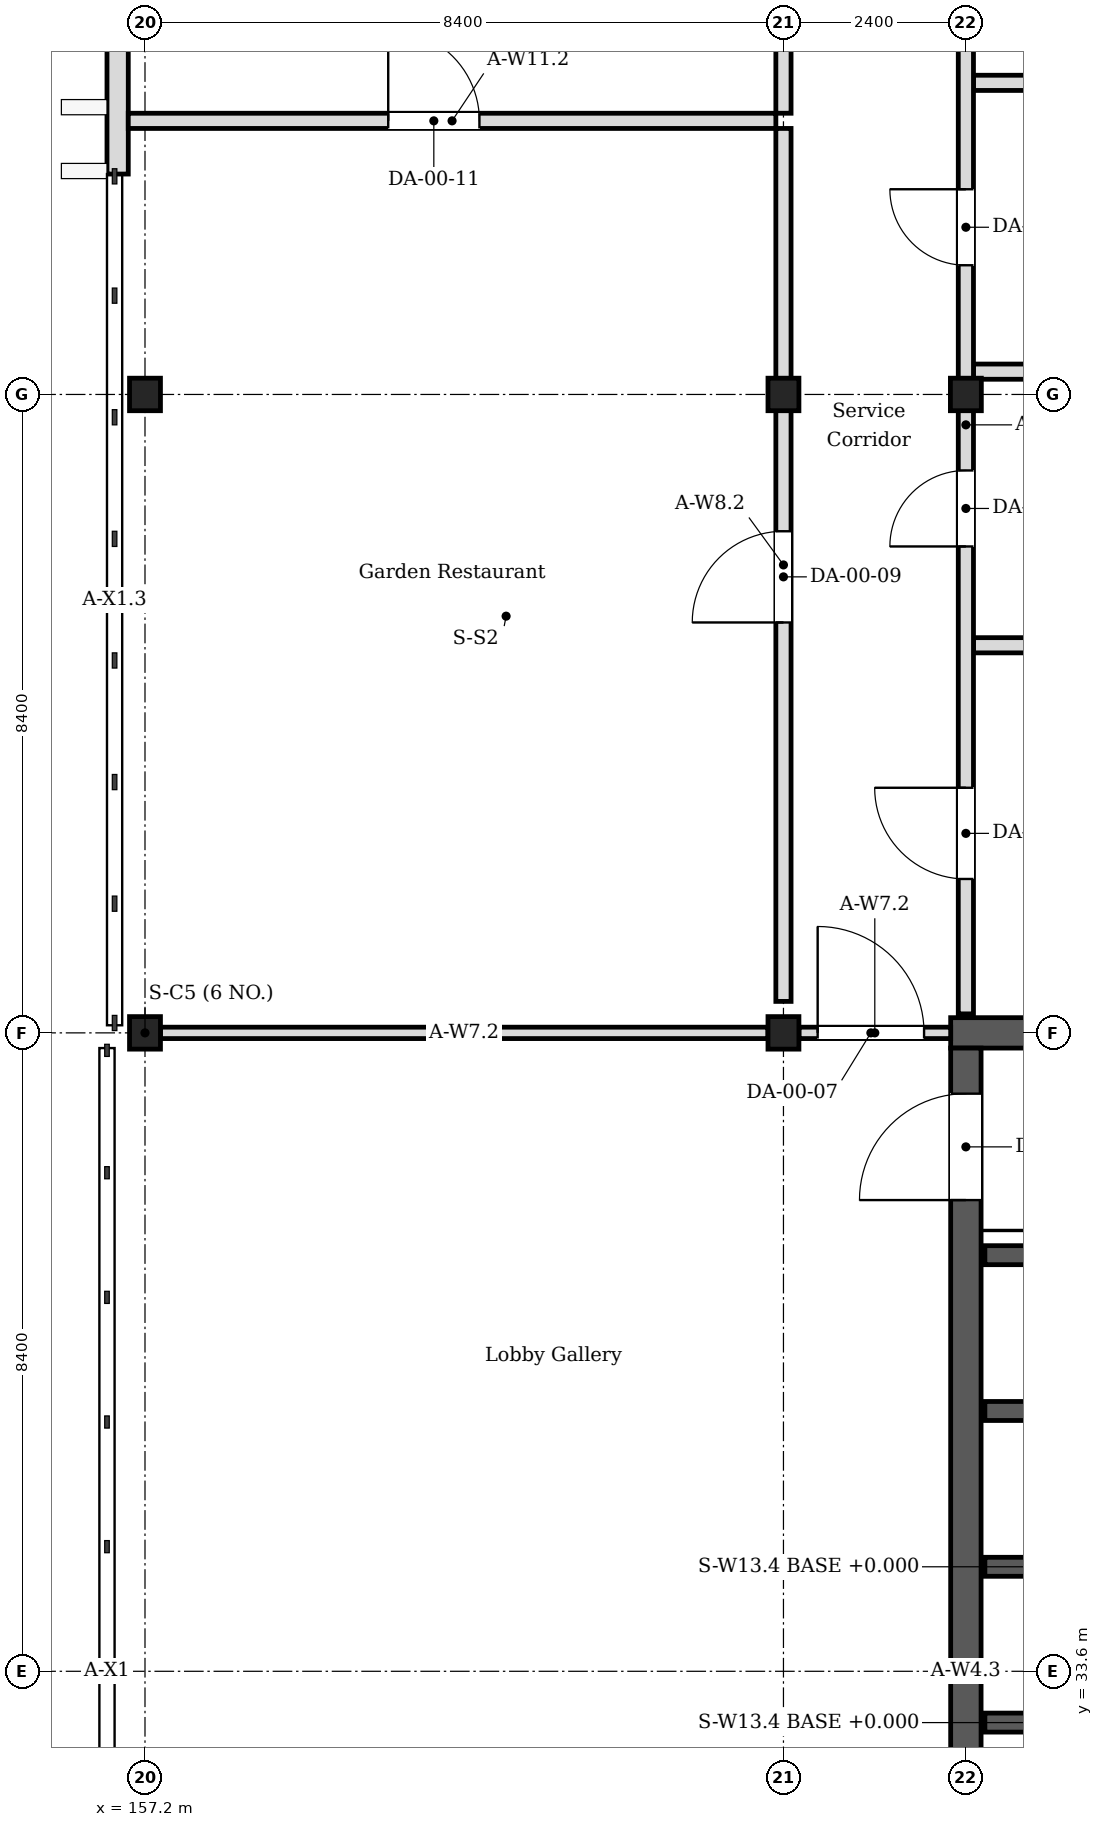
"""IFC4 building model, lengths in metres.
Left out: names, types, materials, properties, quantities, classifications, styles, units other than length and angle.
Written with IfcOpenShell. Run it as: python <this file> out.ifc"""

import sys

from ifc_helpers import new_model, si_unit, direction, frame, frame_2d, origin, origin_2d, place, context, subcontext, project, spatial, rectangle, i_section, extrude, element, fill, save


model = new_model("IFC4")
c1 = context("Model", 3, precision=1e-05, world=origin(), true_north=direction((0.0, 1.0)))
c2 = subcontext(c1, "Body", "Model", "MODEL_VIEW")
j1 = project(units=[si_unit("LENGTHUNIT", "METRE"), si_unit("PLANEANGLEUNIT", "RADIAN")], contexts=[c1])
p1 = place(None, origin())
s1 = spatial("IfcSite", under=j1, at=p1, CompositionType="ELEMENT")
p2 = place(p1, origin())
s2 = spatial("IfcBuilding", under=s1, at=p2, CompositionType="ELEMENT")
p3 = place(p2, origin())
s3 = spatial("IfcBuildingStorey", under=s2, at=p3, CompositionType="ELEMENT", Elevation=0.0)
for number, where, z_axis, x_axis in (
    (1, (157.2, 42.0, 0.0), (0.0, 0.0, 1.0), (1.0, 0.0, 0.0)),
    (2, (157.2, 50.4, 0.0), (0.0, 0.0, 1.0), (1.0, 0.0, 0.0)),
    (3, (165.6, 42.0, 0.0), (0.0, 0.0, 1.0), (1.0, 0.0, 0.0)),
    (4, (165.6, 50.4, 0.0), (0.0, 0.0, 1.0), (1.0, 0.0, 0.0)),
    (5, (168.0, 50.4, 0.0), (0.0, 0.0, 1.0), (1.0, 0.0, 0.0)),
):
    element("IfcColumn", number, at=place(p3, frame(where, z_axis=z_axis, x_axis=x_axis)), inside=s3, PredefinedType="COLUMN", context=c2, shape_type="SweptSolid", body=[
        extrude(i_section(OverallWidth=0.407, OverallDepth=0.428, WebThickness=0.02, FlangeThickness=0.035, FilletRadius=0.022, at=origin_2d()), origin(), (0.0, 0.0, 1.0), 6.0),
    ])
p4 = place(p3, frame((167.8, 42.0, 0.0), z_axis=(0.0, 0.0, 1.0), x_axis=(1.0, 0.0, 0.0)))
e6 = element("IfcWall", 6, at=p4, inside=s3, PredefinedType="SOLIDWALL", context=c2, shape_type="SweptSolid", body=[
    extrude(rectangle(XDim=8.8, YDim=0.4, at=frame_2d((4.4, 0.0))), origin(), (0.0, 0.0, 1.0), 5.85),
])
p5 = place(p3, frame((168.0, 25.4, 0.0), z_axis=(0.0, 0.0, 1.0), x_axis=(0.0, 1.0, 0.0)))
e7 = element("IfcWall", 7, at=p5, inside=s3, PredefinedType="SOLIDWALL", context=c2, shape_type="SweptSolid", body=[
    extrude(rectangle(XDim=16.4, YDim=0.4, at=frame_2d((8.2, 0.0))), origin(), (0.0, 0.0, 1.0), 5.85),
])
p6 = place(p5, frame((1.0, 0.0, 0.0)))
e8 = element("IfcOpeningElement", 8, at=p6, cuts=e7, PredefinedType="OPENING", context=c2, shape_type="SweptSolid", body=[
    extrude(rectangle(XDim=1.0, YDim=2.1, at=frame_2d((0.5, 1.05))), frame((0.0, 0.21, 0.0), z_axis=(0.0, -1.0, 0.0), x_axis=(1.0, 0.0, 0.0)), (0.0, 0.0, 1.0), 0.42),
])
p7 = place(p5, frame((14.4, 0.0, 0.0)))
e9 = element("IfcOpeningElement", 9, at=p7, cuts=e7, PredefinedType="OPENING", context=c2, shape_type="SweptSolid", body=[
    extrude(rectangle(XDim=1.4, YDim=2.1, at=frame_2d((0.7, 1.05))), frame((0.0, 0.21, 0.0), z_axis=(0.0, -1.0, 0.0), x_axis=(1.0, 0.0, 0.0)), (0.0, 0.0, 1.0), 0.42),
])
p8 = place(p3, frame((156.84, 53.3, 0.0), z_axis=(0.0, 0.0, 1.0), x_axis=(0.0, 1.0, 0.0)))
e10 = element("IfcWall", 10, at=p8, inside=s3, PredefinedType="SOLIDWALL", context=c2, shape_type="SweptSolid", body=[
    extrude(rectangle(XDim=14.12, YDim=0.28, at=frame_2d((7.06, 0.0))), origin(), (0.0, 0.0, 1.0), 5.85),
])
p9 = place(p8, frame((5.44, 0.0, 0.6)))
e11 = element("IfcOpeningElement", 11, at=p9, cuts=e10, PredefinedType="OPENING", context=c2, shape_type="SweptSolid", body=[
    extrude(rectangle(XDim=2.52, YDim=2.4, at=frame_2d((1.26, 1.2))), frame((0.0, 0.15, 0.0), z_axis=(0.0, -1.0, 0.0), x_axis=(1.0, 0.0, 0.0)), (0.0, 0.0, 1.0), 0.3),
])
for number, where, z_axis, x_axis in (
    (12, (168.1, 47.1, 0.0), (0.0, 0.0, 1.0), (1.0, 0.0, 0.0)),
    (13, (168.1, 50.7, 0.0), (0.0, 0.0, 1.0), (1.0, 0.0, 0.0)),
    (14, (168.1, 54.5, 0.0), (0.0, 0.0, 1.0), (1.0, 0.0, 0.0)),
):
    element("IfcWall", number, at=place(p3, frame(where, z_axis=z_axis, x_axis=x_axis)), inside=s3, PredefinedType="PARTITIONING", context=c2, shape_type="SweptSolid", body=[
        extrude(rectangle(XDim=8.52, YDim=0.2, at=frame_2d((4.26, 0.0))), origin(), (0.0, 0.0, 1.0), 5.25),
    ])
p10 = place(p3, frame((157.404, 42.0, 0.0), z_axis=(0.0, 0.0, 1.0), x_axis=(1.0, 0.0, 0.0)))
e15 = element("IfcWall", 15, at=p10, inside=s3, PredefinedType="PARTITIONING", context=c2, shape_type="SweptSolid", body=[
    extrude(rectangle(XDim=7.993, YDim=0.15, at=frame_2d((3.997, 0.0))), origin(), (0.0, 0.0, 1.0), 5.404),
])
p11 = place(p3, frame((165.803, 42.0, 0.0), z_axis=(0.0, 0.0, 1.0), x_axis=(1.0, 0.0, 0.0)))
e16 = element("IfcWall", 16, at=p11, inside=s3, PredefinedType="PARTITIONING", context=c2, shape_type="SweptSolid", body=[
    extrude(rectangle(XDim=1.997, YDim=0.15, at=frame_2d((0.998, 0.0))), origin(), (0.0, 0.0, 1.0), 5.404),
])
p12 = place(p11, frame((0.247, 0.0, 0.0)))
e17 = element("IfcOpeningElement", 17, at=p12, cuts=e16, PredefinedType="OPENING", context=c2, shape_type="SweptSolid", body=[
    extrude(rectangle(XDim=1.4, YDim=2.1, at=frame_2d((0.7, 1.05))), frame((0.0, 0.085, 0.0), z_axis=(0.0, -1.0, 0.0), x_axis=(1.0, 0.0, 0.0)), (0.0, 0.0, 1.0), 0.17),
])
p13 = place(p3, frame((156.98, 54.0, 0.0), z_axis=(0.0, 0.0, 1.0), x_axis=(1.0, 0.0, 0.0)))
e18 = element("IfcWall", 18, at=p13, inside=s3, PredefinedType="PARTITIONING", context=c2, shape_type="SweptSolid", body=[
    extrude(rectangle(XDim=8.52, YDim=0.2, at=frame_2d((4.26, 0.0))), origin(), (0.0, 0.0, 1.0), 5.25),
])
p14 = place(p13, frame((3.42, 0.0, 0.0)))
e19 = element("IfcOpeningElement", 19, at=p14, cuts=e18, PredefinedType="OPENING", context=c2, shape_type="SweptSolid", body=[
    extrude(rectangle(XDim=1.2, YDim=2.1, at=frame_2d((0.6, 1.05))), frame((0.0, 0.11, 0.0), z_axis=(0.0, -1.0, 0.0), x_axis=(1.0, 0.0, 0.0)), (0.0, 0.0, 1.0), 0.22),
])
p15 = place(p3, frame((165.6, 42.414, 0.0), z_axis=(0.0, 0.0, 1.0), x_axis=(0.0, 1.0, 0.0)))
e20 = element("IfcWall", 20, at=p15, inside=s3, PredefinedType="PARTITIONING", context=c2, shape_type="SweptSolid", body=[
    extrude(rectangle(XDim=11.486, YDim=0.2, at=frame_2d((5.743, 0.0))), origin(), (0.0, 0.0, 1.0), 5.25),
])
p16 = place(p15, frame((4.986, 0.0, 0.0)))
e21 = element("IfcOpeningElement", 21, at=p16, cuts=e20, PredefinedType="OPENING", context=c2, shape_type="SweptSolid", body=[
    extrude(rectangle(XDim=1.2, YDim=2.1, at=frame_2d((0.6, 1.05))), frame((0.0, 0.11, 0.0), z_axis=(0.0, -1.0, 0.0), x_axis=(1.0, 0.0, 0.0)), (0.0, 0.0, 1.0), 0.22),
])
p17 = place(p3, frame((165.6, 54.1, 0.0), z_axis=(0.0, 0.0, 1.0), x_axis=(0.0, 1.0, 0.0)))
e22 = element("IfcWall", 22, at=p17, inside=s3, PredefinedType="PARTITIONING", context=c2, shape_type="SweptSolid", body=[
    extrude(rectangle(XDim=12.886, YDim=0.2, at=frame_2d((6.443, 0.0))), origin(), (0.0, 0.0, 1.0), 5.25),
])
p18 = place(p17, frame((5.3, 0.0, 0.0)))
e23 = element("IfcOpeningElement", 23, at=p18, cuts=e22, PredefinedType="OPENING", context=c2, shape_type="SweptSolid", body=[
    extrude(rectangle(XDim=1.2, YDim=2.1, at=frame_2d((0.6, 1.05))), frame((0.0, 0.11, 0.0), z_axis=(0.0, -1.0, 0.0), x_axis=(1.0, 0.0, 0.0)), (0.0, 0.0, 1.0), 0.22),
])
p19 = place(p3, frame((168.0, 42.25, 0.0), z_axis=(0.0, 0.0, 1.0), x_axis=(0.0, 1.0, 0.0)))
e24 = element("IfcWall", 24, at=p19, inside=s3, PredefinedType="PARTITIONING", context=c2, shape_type="SweptSolid", body=[
    extrude(rectangle(XDim=16.35, YDim=0.2, at=frame_2d((8.175, 0.0))), origin(), (0.0, 0.0, 1.0), 5.25),
])
p20 = place(p19, frame((1.775, 0.0, 0.0)))
e25 = element("IfcOpeningElement", 25, at=p20, cuts=e24, PredefinedType="OPENING", context=c2, shape_type="SweptSolid", body=[
    extrude(rectangle(XDim=1.2, YDim=2.1, at=frame_2d((0.6, 1.05))), frame((0.0, 0.11, 0.0), z_axis=(0.0, -1.0, 0.0), x_axis=(1.0, 0.0, 0.0)), (0.0, 0.0, 1.0), 0.22),
])
p21 = place(p19, frame((6.15, 0.0, 0.0)))
e26 = element("IfcOpeningElement", 26, at=p21, cuts=e24, PredefinedType="OPENING", context=c2, shape_type="SweptSolid", body=[
    extrude(rectangle(XDim=1.0, YDim=2.1, at=frame_2d((0.5, 1.05))), frame((0.0, 0.11, 0.0), z_axis=(0.0, -1.0, 0.0), x_axis=(1.0, 0.0, 0.0)), (0.0, 0.0, 1.0), 0.22),
])
p22 = place(p19, frame((9.85, 0.0, 0.0)))
e27 = element("IfcOpeningElement", 27, at=p22, cuts=e24, PredefinedType="OPENING", context=c2, shape_type="SweptSolid", body=[
    extrude(rectangle(XDim=1.0, YDim=2.1, at=frame_2d((0.5, 1.05))), frame((0.0, 0.11, 0.0), z_axis=(0.0, -1.0, 0.0), x_axis=(1.0, 0.0, 0.0)), (0.0, 0.0, 1.0), 0.22),
])
p23 = place(p19, frame((12.8, 0.0, 0.0)))
e28 = element("IfcOpeningElement", 28, at=p23, cuts=e24, PredefinedType="OPENING", context=c2, shape_type="SweptSolid", body=[
    extrude(rectangle(XDim=1.0, YDim=2.1, at=frame_2d((0.5, 1.05))), frame((0.0, 0.11, 0.0), z_axis=(0.0, -1.0, 0.0), x_axis=(1.0, 0.0, 0.0)), (0.0, 0.0, 1.0), 0.22),
])
p24 = place(p19, frame((14.9, 0.0, 0.0)))
e29 = element("IfcOpeningElement", 29, at=p24, cuts=e24, PredefinedType="OPENING", context=c2, shape_type="SweptSolid", body=[
    extrude(rectangle(XDim=1.0, YDim=2.1, at=frame_2d((0.5, 1.05))), frame((0.0, 0.11, 0.0), z_axis=(0.0, -1.0, 0.0), x_axis=(1.0, 0.0, 0.0)), (0.0, 0.0, 1.0), 0.22),
])
for number, where, z_axis, x_axis in (
    (30, (168.25, 32.925, 0.0), (0.0, 0.0, 1.0), (1.0, 0.0, 0.0)),
    (31, (168.25, 34.975, 0.0), (0.0, 0.0, 1.0), (1.0, 0.0, 0.0)),
    (32, (168.25, 37.025, 0.0), (0.0, 0.0, 1.0), (1.0, 0.0, 0.0)),
    (33, (168.25, 39.075, 0.0), (0.0, 0.0, 1.0), (1.0, 0.0, 0.0)),
):
    element("IfcWall", number, at=place(p3, frame(where, z_axis=z_axis, x_axis=x_axis)), inside=s3, PredefinedType="SOLIDWALL", context=c2, shape_type="SweptSolid", body=[
        extrude(rectangle(XDim=2.75, YDim=0.25, at=frame_2d((1.375, 0.0))), origin(), (0.0, 0.0, 1.0), 5.85),
    ])
p25 = place(p20, origin())
e34 = element("IfcDoor", 34, at=p25, inside=s3, OperationType="SINGLE_SWING_RIGHT", PredefinedType="DOOR", context=c2, shape_type="SweptSolid", body=[
    extrude(rectangle(XDim=1.2, YDim=2.1, at=frame_2d((0.6, 1.05))), frame((0.0, 0.025, 0.0), z_axis=(0.0, -1.0, 0.0), x_axis=(1.0, 0.0, 0.0)), (0.0, 0.0, 1.0), 0.05),
])
fill(e25, e34)
p26 = place(p21, origin())
e35 = element("IfcDoor", 35, at=p26, inside=s3, OperationType="SINGLE_SWING_LEFT", PredefinedType="DOOR", context=c2, shape_type="SweptSolid", body=[
    extrude(rectangle(XDim=1.0, YDim=2.1, at=frame_2d((0.5, 1.05))), frame((0.0, 0.025, 0.0), z_axis=(0.0, -1.0, 0.0), x_axis=(1.0, 0.0, 0.0)), (0.0, 0.0, 1.0), 0.05),
])
fill(e26, e35)
p27 = place(p22, origin())
e36 = element("IfcDoor", 36, at=p27, inside=s3, OperationType="SINGLE_SWING_RIGHT", PredefinedType="DOOR", context=c2, shape_type="SweptSolid", body=[
    extrude(rectangle(XDim=1.0, YDim=2.1, at=frame_2d((0.5, 1.05))), frame((0.0, 0.025, 0.0), z_axis=(0.0, -1.0, 0.0), x_axis=(1.0, 0.0, 0.0)), (0.0, 0.0, 1.0), 0.05),
])
fill(e27, e36)
p28 = place(p12, origin())
e37 = element("IfcDoor", 37, at=p28, inside=s3, OperationType="DOUBLE_DOOR_DOUBLE_SWING", PredefinedType="DOOR", context=c2, shape_type="SweptSolid", body=[
    extrude(rectangle(XDim=1.4, YDim=2.1, at=frame_2d((0.7, 1.05))), frame((0.0, 0.025, 0.0), z_axis=(0.0, -1.0, 0.0), x_axis=(1.0, 0.0, 0.0)), (0.0, 0.0, 1.0), 0.05),
])
fill(e17, e37)
p29 = place(p16, origin())
e38 = element("IfcDoor", 38, at=p29, inside=s3, OperationType="SINGLE_SWING_LEFT", PredefinedType="DOOR", context=c2, shape_type="SweptSolid", body=[
    extrude(rectangle(XDim=1.2, YDim=2.1, at=frame_2d((0.6, 1.05))), frame((0.0, 0.025, 0.0), z_axis=(0.0, -1.0, 0.0), x_axis=(1.0, 0.0, 0.0)), (0.0, 0.0, 1.0), 0.05),
])
fill(e21, e38)
p30 = place(p14, origin())
e39 = element("IfcDoor", 39, at=p30, inside=s3, OperationType="SINGLE_SWING_LEFT", PredefinedType="DOOR", context=c2, shape_type="SweptSolid", body=[
    extrude(rectangle(XDim=1.2, YDim=2.1, at=frame_2d((0.6, 1.05))), frame((0.0, 0.025, 0.0), z_axis=(0.0, -1.0, 0.0), x_axis=(1.0, 0.0, 0.0)), (0.0, 0.0, 1.0), 0.05),
])
fill(e19, e39)
p31 = place(p7, origin())
e40 = element("IfcDoor", 40, at=p31, inside=s3, OperationType="DOUBLE_DOOR_DOUBLE_SWING", PredefinedType="DOOR", context=c2, shape_type="SweptSolid", body=[
    extrude(rectangle(XDim=1.4, YDim=2.1, at=frame_2d((0.7, 1.05))), frame((0.0, 0.025, 0.0), z_axis=(0.0, -1.0, 0.0), x_axis=(1.0, 0.0, 0.0)), (0.0, 0.0, 1.0), 0.05),
])
fill(e9, e40)
save(model, sys.argv[1])
